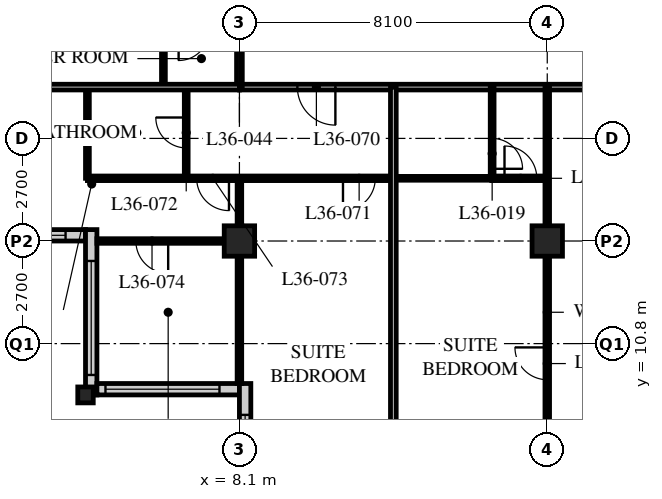
"""IFC4 building model, lengths in metres.
Left out: names, types, materials, properties, quantities, classifications, styles, units other than length and angle.
Written with IfcOpenShell. Run it as: python <this file> out.ifc"""

import sys

from ifc_helpers import new_model, si_unit, direction, frame, frame_2d, origin, origin_2d, place, context, subcontext, project, spatial, rectangle, hollow_rectangle, i_section, extrude, element, fill, save


model = new_model("IFC4")
c1 = context("Model", 3, precision=1e-05, world=origin(), true_north=direction((0.0, 1.0)))
c2 = subcontext(c1, "Body", "Model", "MODEL_VIEW")
j1 = project(units=[si_unit("LENGTHUNIT", "METRE"), si_unit("PLANEANGLEUNIT", "RADIAN")], contexts=[c1])
p1 = place(None, origin())
s1 = spatial("IfcSite", under=j1, at=p1, CompositionType="ELEMENT")
p2 = place(p1, origin())
s2 = spatial("IfcBuilding", under=s1, at=p2, CompositionType="ELEMENT")
p3 = place(p2, frame((0.0, 0.0, 140.8)))
s3 = spatial("IfcBuildingStorey", under=s2, at=p3, CompositionType="ELEMENT", Elevation=140.8)
p4 = place(p3, frame((4.05, 9.45, 0.0), z_axis=(0.0, 0.0, 1.0), x_axis=(1.0, 0.0, 0.0)))
e1 = element("IfcColumn", 1, at=p4, inside=s3, PredefinedType="COLUMN", context=c2, shape_type="SweptSolid", body=[
    extrude(i_section(OverallWidth=0.407, OverallDepth=0.419, WebThickness=0.031, FlangeThickness=0.049, FilletRadius=0.015, at=origin_2d()), origin(), (0.0, 0.0, 1.0), 3.4),
])
for number, where, z_axis, x_axis in (
    (2, (8.1, 13.5, 0.0), (0.0, 0.0, 1.0), (1.0, 0.0, 0.0)),
    (3, (16.2, 13.5, 0.0), (0.0, 0.0, 1.0), (1.0, 0.0, 0.0)),
):
    element("IfcColumn", number, at=place(p3, frame(where, z_axis=z_axis, x_axis=x_axis)), inside=s3, PredefinedType="COLUMN", context=c2, shape_type="SweptSolid", body=[
        extrude(hollow_rectangle(XDim=0.8, YDim=0.8, WallThickness=0.08, at=origin_2d()), origin(), (0.0, 0.0, 1.0), 3.4),
    ])
p5 = place(p3, frame((0.3, 13.65, 0.0), z_axis=(0.0, 0.0, 1.0), x_axis=(1.0, 0.0, 0.0)))
e4 = element("IfcWall", 4, at=p5, inside=s3, PredefinedType="SOLIDWALL", context=c2, shape_type="SweptSolid", body=[
    extrude(rectangle(XDim=3.75, YDim=0.3, at=frame_2d((1.875, 0.0))), origin(), (0.0, 0.0, 1.0), 3.19),
])
p6 = place(p5, frame((0.225, 0.0, 0.9)))
e5 = element("IfcOpeningElement", 5, at=p6, cuts=e4, PredefinedType="OPENING", context=c2, shape_type="SweptSolid", body=[
    extrude(rectangle(XDim=3.0, YDim=1.5, at=frame_2d((1.5, 0.75))), frame((0.0, 0.16, 0.0), z_axis=(0.0, -1.0, 0.0), x_axis=(1.0, 0.0, 0.0)), (0.0, 0.0, 1.0), 0.32),
])
p7 = place(p3, frame((4.2, 13.8, 0.0), z_axis=(0.0, 0.0, 1.0), x_axis=(0.0, -1.0, 0.0)))
e6 = element("IfcWall", 6, at=p7, inside=s3, PredefinedType="SOLIDWALL", context=c2, shape_type="SweptSolid", body=[
    extrude(rectangle(XDim=4.35, YDim=0.3, at=frame_2d((2.175, 0.0))), origin(), (0.0, 0.0, 1.0), 3.19),
])
p8 = place(p7, frame((0.825, 0.0, 0.9)))
e7 = element("IfcOpeningElement", 7, at=p8, cuts=e6, PredefinedType="OPENING", context=c2, shape_type="SweptSolid", body=[
    extrude(rectangle(XDim=3.0, YDim=1.5, at=frame_2d((1.5, 0.75))), frame((0.0, 0.16, 0.0), z_axis=(0.0, -1.0, 0.0), x_axis=(1.0, 0.0, 0.0)), (0.0, 0.0, 1.0), 0.32),
])
p9 = place(p3, frame((4.35, 9.6, 0.0), z_axis=(0.0, 0.0, 1.0), x_axis=(1.0, 0.0, 0.0)))
e8 = element("IfcWall", 8, at=p9, inside=s3, PredefinedType="SOLIDWALL", context=c2, shape_type="SweptSolid", body=[
    extrude(rectangle(XDim=3.75, YDim=0.3, at=frame_2d((1.875, 0.0))), origin(), (0.0, 0.0, 1.0), 3.19),
])
p10 = place(p9, frame((0.225, 0.0, 0.9)))
e9 = element("IfcOpeningElement", 9, at=p10, cuts=e8, PredefinedType="OPENING", context=c2, shape_type="SweptSolid", body=[
    extrude(rectangle(XDim=3.0, YDim=1.5, at=frame_2d((1.5, 0.75))), frame((0.0, 0.16, 0.0), z_axis=(0.0, -1.0, 0.0), x_axis=(1.0, 0.0, 0.0)), (0.0, 0.0, 1.0), 0.32),
])
p11 = place(p3, frame((8.25, 9.75, 0.0), z_axis=(0.0, 0.0, 1.0), x_axis=(0.0, -1.0, 0.0)))
e10 = element("IfcWall", 10, at=p11, inside=s3, PredefinedType="SOLIDWALL", context=c2, shape_type="SweptSolid", body=[
    extrude(rectangle(XDim=4.35, YDim=0.3, at=frame_2d((2.175, 0.0))), origin(), (0.0, 0.0, 1.0), 3.19),
])
p12 = place(p11, frame((0.825, 0.0, 0.9)))
e11 = element("IfcOpeningElement", 11, at=p12, cuts=e10, PredefinedType="OPENING", context=c2, shape_type="SweptSolid", body=[
    extrude(rectangle(XDim=3.0, YDim=1.5, at=frame_2d((1.5, 0.75))), frame((0.0, 0.16, 0.0), z_axis=(0.0, -1.0, 0.0), x_axis=(1.0, 0.0, 0.0)), (0.0, 0.0, 1.0), 0.32),
])
p13 = place(p3, frame((8.1, 17.55, 0.0), z_axis=(0.0, 0.0, 1.0), x_axis=(1.0, 0.0, 0.0)))
e12 = element("IfcWall", 12, at=p13, inside=s3, PredefinedType="PARTITIONING", context=c2, shape_type="SweptSolid", body=[
    extrude(rectangle(XDim=36.45, YDim=0.15, at=frame_2d((18.225, 0.0))), origin(), (0.0, 0.0, 1.0), 3.19),
])
p14 = place(p13, frame((9.625, 0.0, 0.0)))
e13 = element("IfcOpeningElement", 13, at=p14, cuts=e12, PredefinedType="OPENING", context=c2, shape_type="SweptSolid", body=[
    extrude(rectangle(XDim=1.0, YDim=2.1, at=frame_2d((0.5, 1.05))), frame((0.0, 0.085, 0.0), z_axis=(0.0, -1.0, 0.0), x_axis=(1.0, 0.0, 0.0)), (0.0, 0.0, 1.0), 0.17),
])
p15 = place(p13, frame((18.1, 0.0, 0.0)))
e14 = element("IfcOpeningElement", 14, at=p15, cuts=e12, PredefinedType="OPENING", context=c2, shape_type="SweptSolid", body=[
    extrude(rectangle(XDim=1.0, YDim=2.1, at=frame_2d((0.5, 1.05))), frame((0.0, 0.085, 0.0), z_axis=(0.0, -1.0, 0.0), x_axis=(1.0, 0.0, 0.0)), (0.0, 0.0, 1.0), 0.17),
])
p16 = place(p13, frame((26.75, 0.0, 0.0)))
e15 = element("IfcOpeningElement", 15, at=p16, cuts=e12, PredefinedType="OPENING", context=c2, shape_type="SweptSolid", body=[
    extrude(rectangle(XDim=1.0, YDim=2.1, at=frame_2d((0.5, 1.05))), frame((0.0, 0.085, 0.0), z_axis=(0.0, -1.0, 0.0), x_axis=(1.0, 0.0, 0.0)), (0.0, 0.0, 1.0), 0.17),
])
p17 = place(p13, frame((30.8, 0.0, 0.0)))
e16 = element("IfcOpeningElement", 16, at=p17, cuts=e12, PredefinedType="OPENING", context=c2, shape_type="SweptSolid", body=[
    extrude(rectangle(XDim=1.0, YDim=2.1, at=frame_2d((0.5, 1.05))), frame((0.0, 0.085, 0.0), z_axis=(0.0, -1.0, 0.0), x_axis=(1.0, 0.0, 0.0)), (0.0, 0.0, 1.0), 0.17),
])
p18 = place(p13, frame((1.525, 0.0, 0.0)))
e17 = element("IfcOpeningElement", 17, at=p18, cuts=e12, PredefinedType="OPENING", context=c2, shape_type="SweptSolid", body=[
    extrude(rectangle(XDim=1.0, YDim=2.1, at=frame_2d((0.5, 1.05))), frame((0.0, 0.085, 0.0), z_axis=(0.0, -1.0, 0.0), x_axis=(1.0, 0.0, 0.0)), (0.0, 0.0, 1.0), 0.17),
])
p19 = place(p13, frame((33.925, 0.0, 0.0)))
e18 = element("IfcOpeningElement", 18, at=p19, cuts=e12, PredefinedType="OPENING", context=c2, shape_type="SweptSolid", body=[
    extrude(rectangle(XDim=1.0, YDim=2.1, at=frame_2d((0.5, 1.05))), frame((0.0, 0.085, 0.0), z_axis=(0.0, -1.0, 0.0), x_axis=(1.0, 0.0, 0.0)), (0.0, 0.0, 1.0), 0.17),
])
p20 = place(p3, frame((8.1, 17.55, 0.0), z_axis=(0.0, 0.0, 1.0), x_axis=(0.0, 1.0, 0.0)))
e19 = element("IfcWall", 19, at=p20, inside=s3, PredefinedType="PARTITIONING", context=c2, shape_type="SweptSolid", body=[
    extrude(rectangle(XDim=28.35, YDim=0.15, at=frame_2d((14.175, 0.0))), origin(), (0.0, 0.0, 1.0), 2.578),
])
p21 = place(p20, frame((1.9, 0.0, 0.0)))
e20 = element("IfcOpeningElement", 20, at=p21, cuts=e19, PredefinedType="OPENING", context=c2, shape_type="SweptSolid", body=[
    extrude(rectangle(XDim=1.0, YDim=2.1, at=frame_2d((0.5, 1.05))), frame((0.0, 0.085, 0.0), z_axis=(0.0, -1.0, 0.0), x_axis=(1.0, 0.0, 0.0)), (0.0, 0.0, 1.0), 0.17),
])
p22 = place(p20, frame((10.0, 0.0, 0.0)))
e21 = element("IfcOpeningElement", 21, at=p22, cuts=e19, PredefinedType="OPENING", context=c2, shape_type="SweptSolid", body=[
    extrude(rectangle(XDim=1.0, YDim=2.1, at=frame_2d((0.5, 1.05))), frame((0.0, 0.085, 0.0), z_axis=(0.0, -1.0, 0.0), x_axis=(1.0, 0.0, 0.0)), (0.0, 0.0, 1.0), 0.17),
])
p23 = place(p20, frame((18.1, 0.0, 0.0)))
e22 = element("IfcOpeningElement", 22, at=p23, cuts=e19, PredefinedType="OPENING", context=c2, shape_type="SweptSolid", body=[
    extrude(rectangle(XDim=1.0, YDim=2.1, at=frame_2d((0.5, 1.05))), frame((0.0, 0.085, 0.0), z_axis=(0.0, -1.0, 0.0), x_axis=(1.0, 0.0, 0.0)), (0.0, 0.0, 1.0), 0.17),
])
p24 = place(p20, frame((24.9, 0.0, 0.0)))
e23 = element("IfcOpeningElement", 23, at=p24, cuts=e19, PredefinedType="OPENING", context=c2, shape_type="SweptSolid", body=[
    extrude(rectangle(XDim=1.0, YDim=2.1, at=frame_2d((0.5, 1.05))), frame((0.0, 0.085, 0.0), z_axis=(0.0, -1.0, 0.0), x_axis=(1.0, 0.0, 0.0)), (0.0, 0.0, 1.0), 0.17),
])
p25 = place(p3, frame((12.15, 15.15, 0.0), z_axis=(0.0, 0.0, 1.0), x_axis=(1.0, 0.0, 0.0)))
e24 = element("IfcWall", 24, at=p25, inside=s3, PredefinedType="PARTITIONING", context=c2, shape_type="SweptSolid", body=[
    extrude(rectangle(XDim=2.6, YDim=0.1, at=frame_2d((1.3, 0.0))), origin(), (0.0, 0.0, 1.0), 3.19),
])
p26 = place(p3, frame((14.75, 17.55, 0.0), z_axis=(0.0, 0.0, 1.0), x_axis=(0.0, -1.0, 0.0)))
e25 = element("IfcWall", 25, at=p26, inside=s3, PredefinedType="PARTITIONING", context=c2, shape_type="SweptSolid", body=[
    extrude(rectangle(XDim=2.4, YDim=0.1, at=frame_2d((1.2, 0.0))), origin(), (0.0, 0.0, 1.0), 3.19),
])
p27 = place(p26, frame((1.35, 0.0, 0.0)))
e26 = element("IfcOpeningElement", 26, at=p27, cuts=e25, PredefinedType="OPENING", context=c2, shape_type="SweptSolid", body=[
    extrude(rectangle(XDim=0.8, YDim=2.1, at=frame_2d((0.4, 1.05))), frame((0.0, 0.06, 0.0), z_axis=(0.0, -1.0, 0.0), x_axis=(1.0, 0.0, 0.0)), (0.0, 0.0, 1.0), 0.12),
])
p28 = place(p3, frame((16.2, 17.55, 0.0), z_axis=(0.0, 0.0, 1.0), x_axis=(0.0, -1.0, 0.0)))
e27 = element("IfcWall", 27, at=p28, inside=s3, PredefinedType="PARTITIONING", context=c2, shape_type="SweptSolid", body=[
    extrude(rectangle(XDim=11.85, YDim=0.12, at=frame_2d((5.925, 0.0))), origin(), (0.0, 0.0, 1.0), 2.578),
])
p29 = place(p28, frame((6.85, 0.0, 0.0)))
e28 = element("IfcOpeningElement", 28, at=p29, cuts=e27, PredefinedType="OPENING", context=c2, shape_type="SweptSolid", body=[
    extrude(rectangle(XDim=0.85, YDim=2.1, at=frame_2d((0.425, 1.05))), frame((0.0, 0.07, 0.0), z_axis=(0.0, -1.0, 0.0), x_axis=(1.0, 0.0, 0.0)), (0.0, 0.0, 1.0), 0.14),
])
p30 = place(p3, frame((6.1, 17.55, 0.0), z_axis=(0.0, 0.0, 1.0), x_axis=(0.0, 1.0, 0.0)))
e29 = element("IfcWall", 29, at=p30, inside=s3, PredefinedType="PARTITIONING", context=c2, shape_type="SweptSolid", body=[
    extrude(rectangle(XDim=1.5, YDim=0.1, at=frame_2d((0.75, 0.0))), origin(), (0.0, 0.0, 1.0), 3.19),
])
p31 = place(p3, frame((6.7, 17.55, 0.0), z_axis=(0.0, 0.0, 1.0), x_axis=(0.0, -1.0, 0.0)))
e30 = element("IfcWall", 30, at=p31, inside=s3, PredefinedType="PARTITIONING", context=c2, shape_type="SweptSolid", body=[
    extrude(rectangle(XDim=2.4, YDim=0.1, at=frame_2d((1.2, 0.0))), origin(), (0.0, 0.0, 1.0), 3.19),
])
p32 = place(p31, frame((0.8, 0.0, 0.0)))
e31 = element("IfcOpeningElement", 31, at=p32, cuts=e30, PredefinedType="OPENING", context=c2, shape_type="SweptSolid", body=[
    extrude(rectangle(XDim=0.8, YDim=2.1, at=frame_2d((0.4, 1.05))), frame((0.0, 0.06, 0.0), z_axis=(0.0, -1.0, 0.0), x_axis=(1.0, 0.0, 0.0)), (0.0, 0.0, 1.0), 0.12),
])
p33 = place(p3, frame((4.1, 17.55, 0.0), z_axis=(0.0, 0.0, 1.0), x_axis=(0.0, -1.0, 0.0)))
e32 = element("IfcWall", 32, at=p33, inside=s3, PredefinedType="PARTITIONING", context=c2, shape_type="SweptSolid", body=[
    extrude(rectangle(XDim=2.4, YDim=0.1, at=frame_2d((1.2, 0.0))), origin(), (0.0, 0.0, 1.0), 3.19),
])
p34 = place(p3, frame((4.1, 15.15, 0.0), z_axis=(0.0, 0.0, 1.0), x_axis=(1.0, 0.0, 0.0)))
e33 = element("IfcWall", 33, at=p34, inside=s3, PredefinedType="PARTITIONING", context=c2, shape_type="SweptSolid", body=[
    extrude(rectangle(XDim=8.05, YDim=0.12, at=frame_2d((4.025, 0.0))), origin(), (0.0, 0.0, 1.0), 3.19),
])
p35 = place(p34, frame((6.725, 0.0, 0.0)))
e34 = element("IfcOpeningElement", 34, at=p35, cuts=e33, PredefinedType="OPENING", context=c2, shape_type="SweptSolid", body=[
    extrude(rectangle(XDim=0.85, YDim=2.1, at=frame_2d((0.425, 1.05))), frame((0.0, 0.07, 0.0), z_axis=(0.0, -1.0, 0.0), x_axis=(1.0, 0.0, 0.0)), (0.0, 0.0, 1.0), 0.14),
])
p36 = place(p34, frame((2.875, 0.0, 0.0)))
e35 = element("IfcOpeningElement", 35, at=p36, cuts=e33, PredefinedType="OPENING", context=c2, shape_type="SweptSolid", body=[
    extrude(rectangle(XDim=0.85, YDim=2.1, at=frame_2d((0.425, 1.05))), frame((0.0, 0.07, 0.0), z_axis=(0.0, -1.0, 0.0), x_axis=(1.0, 0.0, 0.0)), (0.0, 0.0, 1.0), 0.14),
])
p37 = place(p3, frame((8.1, 15.15, 0.0), z_axis=(0.0, 0.0, 1.0), x_axis=(0.0, -1.0, 0.0)))
e36 = element("IfcWall", 36, at=p37, inside=s3, PredefinedType="PARTITIONING", context=c2, shape_type="SweptSolid", body=[
    extrude(rectangle(XDim=5.4, YDim=0.12, at=frame_2d((2.7, 0.0))), origin(), (0.0, 0.0, 1.0), 2.578),
])
p38 = place(p3, frame((8.1, 13.5, 0.0), z_axis=(0.0, 0.0, 1.0), x_axis=(-1.0, 0.0, 0.0)))
e37 = element("IfcWall", 37, at=p38, inside=s3, PredefinedType="PARTITIONING", context=c2, shape_type="SweptSolid", body=[
    extrude(rectangle(XDim=3.75, YDim=0.12, at=frame_2d((1.875, 0.0))), origin(), (0.0, 0.0, 1.0), 2.578),
])
p39 = place(p38, frame((1.875, 0.0, 0.0)))
e38 = element("IfcOpeningElement", 38, at=p39, cuts=e37, PredefinedType="OPENING", context=c2, shape_type="SweptSolid", body=[
    extrude(rectangle(XDim=0.85, YDim=2.1, at=frame_2d((0.425, 1.05))), frame((0.0, 0.07, 0.0), z_axis=(0.0, -1.0, 0.0), x_axis=(1.0, 0.0, 0.0)), (0.0, 0.0, 1.0), 0.14),
])
p40 = place(p3, frame((0.3, 17.55, 0.0), z_axis=(0.0, 0.0, 1.0), x_axis=(1.0, 0.0, 0.0)))
e39 = element("IfcWall", 39, at=p40, inside=s3, PredefinedType="PARTITIONING", context=c2, shape_type="SweptSolid", body=[
    extrude(rectangle(XDim=7.8, YDim=0.15, at=frame_2d((3.9, 0.0))), origin(), (0.0, 0.0, 1.0), 3.19),
])
p41 = place(p3, frame((12.15, 17.55, 0.0), z_axis=(0.0, 0.0, 1.0), x_axis=(0.0, -1.0, 0.0)))
e40 = element("IfcWall", 40, at=p41, inside=s3, PredefinedType="PARTITIONING", context=c2, shape_type="SweptSolid", body=[
    extrude(rectangle(XDim=11.85, YDim=0.15, at=frame_2d((5.925, 0.0))), origin(), (0.0, 0.0, 1.0), 3.19),
])
p42 = place(p3, frame((16.2, 15.15, 0.0), z_axis=(0.0, 0.0, 1.0), x_axis=(-1.0, 0.0, 0.0)))
e41 = element("IfcWall", 41, at=p42, inside=s3, PredefinedType="PARTITIONING", context=c2, shape_type="SweptSolid", body=[
    extrude(rectangle(XDim=1.46, YDim=0.12, at=frame_2d((0.73, 0.0))), origin(), (0.0, 0.0, 1.0), 3.19),
])
p43 = place(p42, frame((0.275, 0.0, 0.0)))
e42 = element("IfcOpeningElement", 42, at=p43, cuts=e41, PredefinedType="OPENING", context=c2, shape_type="SweptSolid", body=[
    extrude(rectangle(XDim=0.85, YDim=2.1, at=frame_2d((0.425, 1.05))), frame((0.0, 0.07, 0.0), z_axis=(0.0, -1.0, 0.0), x_axis=(1.0, 0.0, 0.0)), (0.0, 0.0, 1.0), 0.14),
])
p44 = place(p6, origin())
e43 = element("IfcWindow", 43, at=p44, inside=s3, PartitioningType="SINGLE_PANEL", PredefinedType="WINDOW", context=c2, shape_type="SweptSolid", body=[
    extrude(rectangle(XDim=3.0, YDim=1.5, at=frame_2d((1.5, 0.75))), frame((0.0, 0.03, 0.0), z_axis=(0.0, -1.0, 0.0), x_axis=(1.0, 0.0, 0.0)), (0.0, 0.0, 1.0), 0.06),
])
fill(e5, e43)
p45 = place(p8, origin())
e44 = element("IfcWindow", 44, at=p45, inside=s3, PartitioningType="SINGLE_PANEL", PredefinedType="WINDOW", context=c2, shape_type="SweptSolid", body=[
    extrude(rectangle(XDim=3.0, YDim=1.5, at=frame_2d((1.5, 0.75))), frame((0.0, 0.03, 0.0), z_axis=(0.0, -1.0, 0.0), x_axis=(1.0, 0.0, 0.0)), (0.0, 0.0, 1.0), 0.06),
])
fill(e7, e44)
p46 = place(p10, origin())
e45 = element("IfcWindow", 45, at=p46, inside=s3, PartitioningType="SINGLE_PANEL", PredefinedType="WINDOW", context=c2, shape_type="SweptSolid", body=[
    extrude(rectangle(XDim=3.0, YDim=1.5, at=frame_2d((1.5, 0.75))), frame((0.0, 0.03, 0.0), z_axis=(0.0, -1.0, 0.0), x_axis=(1.0, 0.0, 0.0)), (0.0, 0.0, 1.0), 0.06),
])
fill(e9, e45)
p47 = place(p12, origin())
e46 = element("IfcWindow", 46, at=p47, inside=s3, PartitioningType="SINGLE_PANEL", PredefinedType="WINDOW", context=c2, shape_type="SweptSolid", body=[
    extrude(rectangle(XDim=3.0, YDim=1.5, at=frame_2d((1.5, 0.75))), frame((0.0, 0.03, 0.0), z_axis=(0.0, -1.0, 0.0), x_axis=(1.0, 0.0, 0.0)), (0.0, 0.0, 1.0), 0.06),
])
fill(e11, e46)
p48 = place(p27, origin())
e47 = element("IfcDoor", 47, at=p48, inside=s3, OperationType="SINGLE_SWING_RIGHT", PredefinedType="DOOR", context=c2, shape_type="SweptSolid", body=[
    extrude(rectangle(XDim=0.8, YDim=2.1, at=frame_2d((0.4, 1.05))), frame((0.0, 0.025, 0.0), z_axis=(0.0, -1.0, 0.0), x_axis=(1.0, 0.0, 0.0)), (0.0, 0.0, 1.0), 0.05),
])
fill(e26, e47)
p49 = place(p29, origin())
e48 = element("IfcDoor", 48, at=p49, inside=s3, OperationType="SINGLE_SWING_RIGHT", PredefinedType="DOOR", context=c2, shape_type="SweptSolid", body=[
    extrude(rectangle(XDim=0.85, YDim=2.1, at=frame_2d((0.425, 1.05))), frame((0.0, 0.025, 0.0), z_axis=(0.0, -1.0, 0.0), x_axis=(1.0, 0.0, 0.0)), (0.0, 0.0, 1.0), 0.05),
])
fill(e28, e48)
p50 = place(p18, origin())
e49 = element("IfcDoor", 49, at=p50, inside=s3, OperationType="SINGLE_SWING_LEFT", PredefinedType="DOOR", context=c2, shape_type="SweptSolid", body=[
    extrude(rectangle(XDim=1.0, YDim=2.1, at=frame_2d((0.5, 1.05))), frame((0.0, 0.025, 0.0), z_axis=(0.0, -1.0, 0.0), x_axis=(1.0, 0.0, 0.0)), (0.0, 0.0, 1.0), 0.05),
])
fill(e17, e49)
p51 = place(p35, origin())
e50 = element("IfcDoor", 50, at=p51, inside=s3, OperationType="SINGLE_SWING_RIGHT", PredefinedType="DOOR", context=c2, shape_type="SweptSolid", body=[
    extrude(rectangle(XDim=0.85, YDim=2.1, at=frame_2d((0.425, 1.05))), frame((0.0, 0.025, 0.0), z_axis=(0.0, -1.0, 0.0), x_axis=(1.0, 0.0, 0.0)), (0.0, 0.0, 1.0), 0.05),
])
fill(e34, e50)
p52 = place(p32, origin())
e51 = element("IfcDoor", 51, at=p52, inside=s3, OperationType="SINGLE_SWING_RIGHT", PredefinedType="DOOR", context=c2, shape_type="SweptSolid", body=[
    extrude(rectangle(XDim=0.8, YDim=2.1, at=frame_2d((0.4, 1.05))), frame((0.0, 0.025, 0.0), z_axis=(0.0, -1.0, 0.0), x_axis=(1.0, 0.0, 0.0)), (0.0, 0.0, 1.0), 0.05),
])
fill(e31, e51)
p53 = place(p36, origin())
e52 = element("IfcDoor", 52, at=p53, inside=s3, OperationType="SINGLE_SWING_LEFT", PredefinedType="DOOR", context=c2, shape_type="SweptSolid", body=[
    extrude(rectangle(XDim=0.85, YDim=2.1, at=frame_2d((0.425, 1.05))), frame((0.0, 0.025, 0.0), z_axis=(0.0, -1.0, 0.0), x_axis=(1.0, 0.0, 0.0)), (0.0, 0.0, 1.0), 0.05),
])
fill(e35, e52)
p54 = place(p39, origin())
e53 = element("IfcDoor", 53, at=p54, inside=s3, OperationType="SINGLE_SWING_LEFT", PredefinedType="DOOR", context=c2, shape_type="SweptSolid", body=[
    extrude(rectangle(XDim=0.85, YDim=2.1, at=frame_2d((0.425, 1.05))), frame((0.0, 0.025, 0.0), z_axis=(0.0, -1.0, 0.0), x_axis=(1.0, 0.0, 0.0)), (0.0, 0.0, 1.0), 0.05),
])
fill(e38, e53)
p55 = place(p43, origin())
e54 = element("IfcDoor", 54, at=p55, inside=s3, OperationType="SINGLE_SWING_LEFT", PredefinedType="DOOR", context=c2, shape_type="SweptSolid", body=[
    extrude(rectangle(XDim=0.85, YDim=2.1, at=frame_2d((0.425, 1.05))), frame((0.0, 0.025, 0.0), z_axis=(0.0, -1.0, 0.0), x_axis=(1.0, 0.0, 0.0)), (0.0, 0.0, 1.0), 0.05),
])
fill(e42, e54)
save(model, sys.argv[1])
